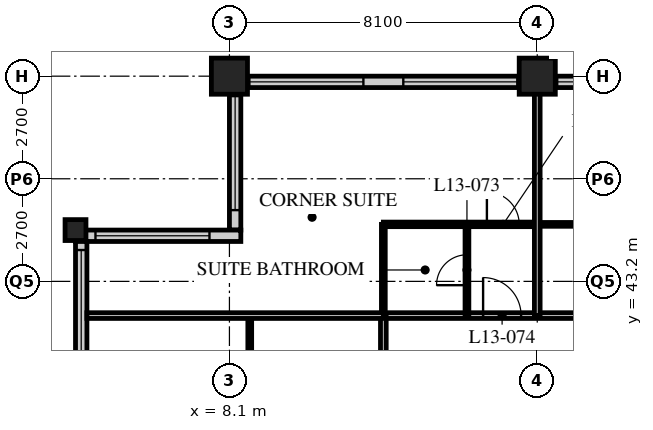
"""IFC4 building model, lengths in metres.
Left out: names, types, materials, properties, quantities, classifications, styles, units other than length and angle.
Written with IfcOpenShell. Run it as: python <this file> out.ifc"""

import sys

from ifc_helpers import new_model, si_unit, direction, frame, frame_2d, origin, origin_2d, place, context, subcontext, project, spatial, rectangle, hollow_rectangle, extrude, element, fill, save


model = new_model("IFC4")
c1 = context("Model", 3, precision=1e-05, world=origin(), true_north=direction((0.0, 1.0)))
c2 = subcontext(c1, "Body", "Model", "MODEL_VIEW")
j1 = project(units=[si_unit("LENGTHUNIT", "METRE"), si_unit("PLANEANGLEUNIT", "RADIAN")], contexts=[c1])
p1 = place(None, origin())
s1 = spatial("IfcSite", under=j1, at=p1, CompositionType="ELEMENT")
p2 = place(p1, origin())
s2 = spatial("IfcBuilding", under=s1, at=p2, CompositionType="ELEMENT")
p3 = place(p2, frame((0.0, 0.0, 56.8)))
s3 = spatial("IfcBuildingStorey", under=s2, at=p3, CompositionType="ELEMENT", Elevation=56.8)
p4 = place(p3, frame((4.05, 44.55, 0.0), z_axis=(0.0, 0.0, 1.0), x_axis=(1.0, 0.0, 0.0)))
e1 = element("IfcColumn", 1, at=p4, inside=s3, PredefinedType="COLUMN", context=c2, shape_type="SweptSolid", body=[
    extrude(hollow_rectangle(XDim=0.55, YDim=0.55, WallThickness=0.05, at=origin_2d()), origin(), (0.0, 0.0, 1.0), 3.4),
])
for number, where, z_axis, x_axis in (
    (2, (8.1, 48.6, 0.0), (0.0, 0.0, 1.0), (1.0, 0.0, 0.0)),
    (3, (16.2, 48.6, 0.0), (0.0, 0.0, 1.0), (1.0, 0.0, 0.0)),
):
    element("IfcColumn", number, at=place(p3, frame(where, z_axis=z_axis, x_axis=x_axis)), inside=s3, PredefinedType="COLUMN", context=c2, shape_type="SweptSolid", body=[
        extrude(hollow_rectangle(XDim=0.95, YDim=0.95, WallThickness=0.095, at=origin_2d()), origin(), (0.0, 0.0, 1.0), 3.4),
    ])
p5 = place(p3, frame((48.3, 48.45, 0.0), z_axis=(0.0, 0.0, 1.0), x_axis=(-1.0, 0.0, 0.0)))
e4 = element("IfcWall", 4, at=p5, inside=s3, PredefinedType="SOLIDWALL", context=c2, shape_type="SweptSolid", body=[
    extrude(rectangle(XDim=40.2, YDim=0.3, at=frame_2d((20.1, 0.0))), origin(), (0.0, 0.0, 1.0), 3.19),
])
p6 = place(p5, frame((0.225, 0.0, 0.9)))
e5 = element("IfcOpeningElement", 5, at=p6, cuts=e4, PredefinedType="OPENING", context=c2, shape_type="SweptSolid", body=[
    extrude(rectangle(XDim=3.0, YDim=2.0, at=frame_2d((1.5, 1.0))), frame((0.0, 0.16, 0.0), z_axis=(0.0, -1.0, 0.0), x_axis=(1.0, 0.0, 0.0)), (0.0, 0.0, 1.0), 0.32),
])
p7 = place(p5, frame((4.275, 0.0, 0.9)))
e6 = element("IfcOpeningElement", 6, at=p7, cuts=e4, PredefinedType="OPENING", context=c2, shape_type="SweptSolid", body=[
    extrude(rectangle(XDim=3.0, YDim=2.0, at=frame_2d((1.5, 1.0))), frame((0.0, 0.16, 0.0), z_axis=(0.0, -1.0, 0.0), x_axis=(1.0, 0.0, 0.0)), (0.0, 0.0, 1.0), 0.32),
])
p8 = place(p5, frame((8.325, 0.0, 0.9)))
e7 = element("IfcOpeningElement", 7, at=p8, cuts=e4, PredefinedType="OPENING", context=c2, shape_type="SweptSolid", body=[
    extrude(rectangle(XDim=3.0, YDim=2.0, at=frame_2d((1.5, 1.0))), frame((0.0, 0.16, 0.0), z_axis=(0.0, -1.0, 0.0), x_axis=(1.0, 0.0, 0.0)), (0.0, 0.0, 1.0), 0.32),
])
p9 = place(p5, frame((12.375, 0.0, 0.9)))
e8 = element("IfcOpeningElement", 8, at=p9, cuts=e4, PredefinedType="OPENING", context=c2, shape_type="SweptSolid", body=[
    extrude(rectangle(XDim=3.0, YDim=2.0, at=frame_2d((1.5, 1.0))), frame((0.0, 0.16, 0.0), z_axis=(0.0, -1.0, 0.0), x_axis=(1.0, 0.0, 0.0)), (0.0, 0.0, 1.0), 0.32),
])
p10 = place(p5, frame((16.425, 0.0, 0.9)))
e9 = element("IfcOpeningElement", 9, at=p10, cuts=e4, PredefinedType="OPENING", context=c2, shape_type="SweptSolid", body=[
    extrude(rectangle(XDim=3.0, YDim=2.0, at=frame_2d((1.5, 1.0))), frame((0.0, 0.16, 0.0), z_axis=(0.0, -1.0, 0.0), x_axis=(1.0, 0.0, 0.0)), (0.0, 0.0, 1.0), 0.32),
])
p11 = place(p5, frame((20.475, 0.0, 0.9)))
e10 = element("IfcOpeningElement", 10, at=p11, cuts=e4, PredefinedType="OPENING", context=c2, shape_type="SweptSolid", body=[
    extrude(rectangle(XDim=3.0, YDim=2.0, at=frame_2d((1.5, 1.0))), frame((0.0, 0.16, 0.0), z_axis=(0.0, -1.0, 0.0), x_axis=(1.0, 0.0, 0.0)), (0.0, 0.0, 1.0), 0.32),
])
p12 = place(p5, frame((24.525, 0.0, 0.9)))
e11 = element("IfcOpeningElement", 11, at=p12, cuts=e4, PredefinedType="OPENING", context=c2, shape_type="SweptSolid", body=[
    extrude(rectangle(XDim=3.0, YDim=2.0, at=frame_2d((1.5, 1.0))), frame((0.0, 0.16, 0.0), z_axis=(0.0, -1.0, 0.0), x_axis=(1.0, 0.0, 0.0)), (0.0, 0.0, 1.0), 0.32),
])
p13 = place(p5, frame((28.575, 0.0, 0.9)))
e12 = element("IfcOpeningElement", 12, at=p13, cuts=e4, PredefinedType="OPENING", context=c2, shape_type="SweptSolid", body=[
    extrude(rectangle(XDim=3.0, YDim=2.0, at=frame_2d((1.5, 1.0))), frame((0.0, 0.16, 0.0), z_axis=(0.0, -1.0, 0.0), x_axis=(1.0, 0.0, 0.0)), (0.0, 0.0, 1.0), 0.32),
])
p14 = place(p5, frame((32.625, 0.0, 0.9)))
e13 = element("IfcOpeningElement", 13, at=p14, cuts=e4, PredefinedType="OPENING", context=c2, shape_type="SweptSolid", body=[
    extrude(rectangle(XDim=3.0, YDim=2.0, at=frame_2d((1.5, 1.0))), frame((0.0, 0.16, 0.0), z_axis=(0.0, -1.0, 0.0), x_axis=(1.0, 0.0, 0.0)), (0.0, 0.0, 1.0), 0.32),
])
p15 = place(p5, frame((36.675, 0.0, 0.9)))
e14 = element("IfcOpeningElement", 14, at=p15, cuts=e4, PredefinedType="OPENING", context=c2, shape_type="SweptSolid", body=[
    extrude(rectangle(XDim=3.0, YDim=2.0, at=frame_2d((1.5, 1.0))), frame((0.0, 0.16, 0.0), z_axis=(0.0, -1.0, 0.0), x_axis=(1.0, 0.0, 0.0)), (0.0, 0.0, 1.0), 0.32),
])
p16 = place(p3, frame((8.25, 48.3, 0.0), z_axis=(0.0, 0.0, 1.0), x_axis=(0.0, -1.0, 0.0)))
e15 = element("IfcWall", 15, at=p16, inside=s3, PredefinedType="SOLIDWALL", context=c2, shape_type="SweptSolid", body=[
    extrude(rectangle(XDim=3.75, YDim=0.3, at=frame_2d((1.875, 0.0))), origin(), (0.0, 0.0, 1.0), 3.19),
])
p17 = place(p16, frame((0.225, 0.0, 0.9)))
e16 = element("IfcOpeningElement", 16, at=p17, cuts=e15, PredefinedType="OPENING", context=c2, shape_type="SweptSolid", body=[
    extrude(rectangle(XDim=3.0, YDim=1.5, at=frame_2d((1.5, 0.75))), frame((0.0, 0.16, 0.0), z_axis=(0.0, -1.0, 0.0), x_axis=(1.0, 0.0, 0.0)), (0.0, 0.0, 1.0), 0.32),
])
p18 = place(p3, frame((8.4, 44.4, 0.0), z_axis=(0.0, 0.0, 1.0), x_axis=(-1.0, 0.0, 0.0)))
e17 = element("IfcWall", 17, at=p18, inside=s3, PredefinedType="SOLIDWALL", context=c2, shape_type="SweptSolid", body=[
    extrude(rectangle(XDim=4.35, YDim=0.3, at=frame_2d((2.175, 0.0))), origin(), (0.0, 0.0, 1.0), 3.19),
])
p19 = place(p18, frame((0.825, 0.0, 0.9)))
e18 = element("IfcOpeningElement", 18, at=p19, cuts=e17, PredefinedType="OPENING", context=c2, shape_type="SweptSolid", body=[
    extrude(rectangle(XDim=3.0, YDim=1.5, at=frame_2d((1.5, 0.75))), frame((0.0, 0.16, 0.0), z_axis=(0.0, -1.0, 0.0), x_axis=(1.0, 0.0, 0.0)), (0.0, 0.0, 1.0), 0.32),
])
p20 = place(p3, frame((4.2, 44.25, 0.0), z_axis=(0.0, 0.0, 1.0), x_axis=(0.0, -1.0, 0.0)))
e19 = element("IfcWall", 19, at=p20, inside=s3, PredefinedType="SOLIDWALL", context=c2, shape_type="SweptSolid", body=[
    extrude(rectangle(XDim=3.75, YDim=0.3, at=frame_2d((1.875, 0.0))), origin(), (0.0, 0.0, 1.0), 3.19),
])
p21 = place(p20, frame((0.225, 0.0, 0.9)))
e20 = element("IfcOpeningElement", 20, at=p21, cuts=e19, PredefinedType="OPENING", context=c2, shape_type="SweptSolid", body=[
    extrude(rectangle(XDim=3.0, YDim=1.5, at=frame_2d((1.5, 0.75))), frame((0.0, 0.16, 0.0), z_axis=(0.0, -1.0, 0.0), x_axis=(1.0, 0.0, 0.0)), (0.0, 0.0, 1.0), 0.32),
])
p22 = place(p3, frame((12.15, 42.3, 0.0), z_axis=(0.0, 0.0, 1.0), x_axis=(1.0, 0.0, 0.0)))
e21 = element("IfcWall", 21, at=p22, inside=s3, PredefinedType="PARTITIONING", context=c2, shape_type="SweptSolid", body=[
    extrude(rectangle(XDim=32.4, YDim=0.15, at=frame_2d((16.2, 0.0))), origin(), (0.0, 0.0, 1.0), 3.19),
])
p23 = place(p22, frame((6.5, 0.0, 0.0)))
e22 = element("IfcOpeningElement", 22, at=p23, cuts=e21, PredefinedType="OPENING", context=c2, shape_type="SweptSolid", body=[
    extrude(rectangle(XDim=1.0, YDim=2.1, at=frame_2d((0.5, 1.05))), frame((0.0, 0.085, 0.0), z_axis=(0.0, -1.0, 0.0), x_axis=(1.0, 0.0, 0.0)), (0.0, 0.0, 1.0), 0.17),
])
p24 = place(p22, frame((10.55, 0.0, 0.0)))
e23 = element("IfcOpeningElement", 23, at=p24, cuts=e21, PredefinedType="OPENING", context=c2, shape_type="SweptSolid", body=[
    extrude(rectangle(XDim=1.0, YDim=2.1, at=frame_2d((0.5, 1.05))), frame((0.0, 0.085, 0.0), z_axis=(0.0, -1.0, 0.0), x_axis=(1.0, 0.0, 0.0)), (0.0, 0.0, 1.0), 0.17),
])
p25 = place(p22, frame((14.6, 0.0, 0.0)))
e24 = element("IfcOpeningElement", 24, at=p25, cuts=e21, PredefinedType="OPENING", context=c2, shape_type="SweptSolid", body=[
    extrude(rectangle(XDim=1.0, YDim=2.1, at=frame_2d((0.5, 1.05))), frame((0.0, 0.085, 0.0), z_axis=(0.0, -1.0, 0.0), x_axis=(1.0, 0.0, 0.0)), (0.0, 0.0, 1.0), 0.17),
])
p26 = place(p22, frame((18.65, 0.0, 0.0)))
e25 = element("IfcOpeningElement", 25, at=p26, cuts=e21, PredefinedType="OPENING", context=c2, shape_type="SweptSolid", body=[
    extrude(rectangle(XDim=1.0, YDim=2.1, at=frame_2d((0.5, 1.05))), frame((0.0, 0.085, 0.0), z_axis=(0.0, -1.0, 0.0), x_axis=(1.0, 0.0, 0.0)), (0.0, 0.0, 1.0), 0.17),
])
p27 = place(p22, frame((22.7, 0.0, 0.0)))
e26 = element("IfcOpeningElement", 26, at=p27, cuts=e21, PredefinedType="OPENING", context=c2, shape_type="SweptSolid", body=[
    extrude(rectangle(XDim=1.0, YDim=2.1, at=frame_2d((0.5, 1.05))), frame((0.0, 0.085, 0.0), z_axis=(0.0, -1.0, 0.0), x_axis=(1.0, 0.0, 0.0)), (0.0, 0.0, 1.0), 0.17),
])
p28 = place(p22, frame((26.75, 0.0, 0.0)))
e27 = element("IfcOpeningElement", 27, at=p28, cuts=e21, PredefinedType="OPENING", context=c2, shape_type="SweptSolid", body=[
    extrude(rectangle(XDim=1.0, YDim=2.1, at=frame_2d((0.5, 1.05))), frame((0.0, 0.085, 0.0), z_axis=(0.0, -1.0, 0.0), x_axis=(1.0, 0.0, 0.0)), (0.0, 0.0, 1.0), 0.17),
])
p29 = place(p22, frame((28.775, 0.0, 0.0)))
e28 = element("IfcOpeningElement", 28, at=p29, cuts=e21, PredefinedType="OPENING", context=c2, shape_type="SweptSolid", body=[
    extrude(rectangle(XDim=1.0, YDim=2.1, at=frame_2d((0.5, 1.05))), frame((0.0, 0.085, 0.0), z_axis=(0.0, -1.0, 0.0), x_axis=(1.0, 0.0, 0.0)), (0.0, 0.0, 1.0), 0.17),
])
p30 = place(p22, frame((2.625, 0.0, 0.0)))
e29 = element("IfcOpeningElement", 29, at=p30, cuts=e21, PredefinedType="OPENING", context=c2, shape_type="SweptSolid", body=[
    extrude(rectangle(XDim=1.0, YDim=2.1, at=frame_2d((0.5, 1.05))), frame((0.0, 0.085, 0.0), z_axis=(0.0, -1.0, 0.0), x_axis=(1.0, 0.0, 0.0)), (0.0, 0.0, 1.0), 0.17),
])
p31 = place(p3, frame((12.15, 12.15, 0.0), z_axis=(0.0, 0.0, 1.0), x_axis=(0.0, 1.0, 0.0)))
e30 = element("IfcWall", 30, at=p31, inside=s3, PredefinedType="PARTITIONING", context=c2, shape_type="SweptSolid", body=[
    extrude(rectangle(XDim=30.15, YDim=0.15, at=frame_2d((15.075, 0.0))), origin(), (0.0, 0.0, 1.0), 3.19),
])
p32 = place(p31, frame((2.45, 0.0, 0.0)))
e31 = element("IfcOpeningElement", 31, at=p32, cuts=e30, PredefinedType="OPENING", context=c2, shape_type="SweptSolid", body=[
    extrude(rectangle(XDim=1.0, YDim=2.1, at=frame_2d((0.5, 1.05))), frame((0.0, 0.085, 0.0), z_axis=(0.0, -1.0, 0.0), x_axis=(1.0, 0.0, 0.0)), (0.0, 0.0, 1.0), 0.17),
])
p33 = place(p31, frame((6.5, 0.0, 0.0)))
e32 = element("IfcOpeningElement", 32, at=p33, cuts=e30, PredefinedType="OPENING", context=c2, shape_type="SweptSolid", body=[
    extrude(rectangle(XDim=1.0, YDim=2.1, at=frame_2d((0.5, 1.05))), frame((0.0, 0.085, 0.0), z_axis=(0.0, -1.0, 0.0), x_axis=(1.0, 0.0, 0.0)), (0.0, 0.0, 1.0), 0.17),
])
p34 = place(p31, frame((10.55, 0.0, 0.0)))
e33 = element("IfcOpeningElement", 33, at=p34, cuts=e30, PredefinedType="OPENING", context=c2, shape_type="SweptSolid", body=[
    extrude(rectangle(XDim=1.0, YDim=2.1, at=frame_2d((0.5, 1.05))), frame((0.0, 0.085, 0.0), z_axis=(0.0, -1.0, 0.0), x_axis=(1.0, 0.0, 0.0)), (0.0, 0.0, 1.0), 0.17),
])
p35 = place(p31, frame((14.6, 0.0, 0.0)))
e34 = element("IfcOpeningElement", 34, at=p35, cuts=e30, PredefinedType="OPENING", context=c2, shape_type="SweptSolid", body=[
    extrude(rectangle(XDim=1.0, YDim=2.1, at=frame_2d((0.5, 1.05))), frame((0.0, 0.085, 0.0), z_axis=(0.0, -1.0, 0.0), x_axis=(1.0, 0.0, 0.0)), (0.0, 0.0, 1.0), 0.17),
])
p36 = place(p31, frame((21.65, 0.0, 0.0)))
e35 = element("IfcOpeningElement", 35, at=p36, cuts=e30, PredefinedType="OPENING", context=c2, shape_type="SweptSolid", body=[
    extrude(rectangle(XDim=1.0, YDim=2.1, at=frame_2d((0.5, 1.05))), frame((0.0, 0.085, 0.0), z_axis=(0.0, -1.0, 0.0), x_axis=(1.0, 0.0, 0.0)), (0.0, 0.0, 1.0), 0.17),
])
p37 = place(p31, frame((26.7, 0.0, 0.0)))
e36 = element("IfcOpeningElement", 36, at=p37, cuts=e30, PredefinedType="OPENING", context=c2, shape_type="SweptSolid", body=[
    extrude(rectangle(XDim=1.0, YDim=2.1, at=frame_2d((0.5, 1.05))), frame((0.0, 0.085, 0.0), z_axis=(0.0, -1.0, 0.0), x_axis=(1.0, 0.0, 0.0)), (0.0, 0.0, 1.0), 0.17),
])
for number, where, z_axis, x_axis in (
    (37, (16.2, 44.7, 0.0), (0.0, 0.0, 1.0), (1.0, 0.0, 0.0)),
    (38, (8.635, 40.0, 0.0), (0.0, 0.0, 1.0), (0.0, 1.0, 0.0)),
):
    element("IfcWall", number, at=place(p3, frame(where, z_axis=z_axis, x_axis=x_axis)), inside=s3, PredefinedType="PARTITIONING", context=c2, shape_type="SweptSolid", body=[
        extrude(rectangle(XDim=2.3, YDim=0.1, at=frame_2d((1.15, 0.0))), origin(), (0.0, 0.0, 1.0), 3.19),
    ])
p38 = place(p3, frame((12.15, 44.7, 0.0), z_axis=(0.0, 0.0, 1.0), x_axis=(1.0, 0.0, 0.0)))
e39 = element("IfcWall", 39, at=p38, inside=s3, PredefinedType="PARTITIONING", context=c2, shape_type="SweptSolid", body=[
    extrude(rectangle(XDim=4.05, YDim=0.12, at=frame_2d((2.025, 0.0))), origin(), (0.0, 0.0, 1.0), 3.19),
])
p39 = place(p38, frame((2.725, 0.0, 0.0)))
e40 = element("IfcOpeningElement", 40, at=p39, cuts=e39, PredefinedType="OPENING", context=c2, shape_type="SweptSolid", body=[
    extrude(rectangle(XDim=0.85, YDim=2.1, at=frame_2d((0.425, 1.05))), frame((0.0, 0.07, 0.0), z_axis=(0.0, -1.0, 0.0), x_axis=(1.0, 0.0, 0.0)), (0.0, 0.0, 1.0), 0.14),
])
p40 = place(p3, frame((14.35, 42.3, 0.0), z_axis=(0.0, 0.0, 1.0), x_axis=(0.0, 1.0, 0.0)))
e41 = element("IfcWall", 41, at=p40, inside=s3, PredefinedType="PARTITIONING", context=c2, shape_type="SweptSolid", body=[
    extrude(rectangle(XDim=2.4, YDim=0.1, at=frame_2d((1.2, 0.0))), origin(), (0.0, 0.0, 1.0), 3.19),
])
p41 = place(p40, frame((0.8, 0.0, 0.0)))
e42 = element("IfcOpeningElement", 42, at=p41, cuts=e41, PredefinedType="OPENING", context=c2, shape_type="SweptSolid", body=[
    extrude(rectangle(XDim=0.8, YDim=2.1, at=frame_2d((0.4, 1.05))), frame((0.0, 0.06, 0.0), z_axis=(0.0, -1.0, 0.0), x_axis=(1.0, 0.0, 0.0)), (0.0, 0.0, 1.0), 0.12),
])
p42 = place(p3, frame((12.15, 42.3, 0.0), z_axis=(0.0, 0.0, 1.0), x_axis=(0.0, 1.0, 0.0)))
e43 = element("IfcWall", 43, at=p42, inside=s3, PredefinedType="PARTITIONING", context=c2, shape_type="SweptSolid", body=[
    extrude(rectangle(XDim=2.4, YDim=0.1, at=frame_2d((1.2, 0.0))), origin(), (0.0, 0.0, 1.0), 3.19),
])
p43 = place(p3, frame((4.35, 42.3, 0.0), z_axis=(0.0, 0.0, 1.0), x_axis=(1.0, 0.0, 0.0)))
e44 = element("IfcWall", 44, at=p43, inside=s3, PredefinedType="PARTITIONING", context=c2, shape_type="SweptSolid", body=[
    extrude(rectangle(XDim=7.8, YDim=0.15, at=frame_2d((3.9, 0.0))), origin(), (0.0, 0.0, 1.0), 3.19),
])
p44 = place(p3, frame((16.2, 42.3, 0.0), z_axis=(0.0, 0.0, 1.0), x_axis=(0.0, 1.0, 0.0)))
e45 = element("IfcWall", 45, at=p44, inside=s3, PredefinedType="PARTITIONING", context=c2, shape_type="SweptSolid", body=[
    extrude(rectangle(XDim=6.0, YDim=0.15, at=frame_2d((3.0, 0.0))), origin(), (0.0, 0.0, 1.0), 2.578),
])
p45 = place(p13, origin())
e46 = element("IfcWindow", 46, at=p45, inside=s3, PartitioningType="SINGLE_PANEL", PredefinedType="WINDOW", context=c2, shape_type="SweptSolid", body=[
    extrude(rectangle(XDim=3.0, YDim=2.0, at=frame_2d((1.5, 1.0))), frame((0.0, 0.03, 0.0), z_axis=(0.0, -1.0, 0.0), x_axis=(1.0, 0.0, 0.0)), (0.0, 0.0, 1.0), 0.06),
])
fill(e12, e46)
p46 = place(p14, origin())
e47 = element("IfcWindow", 47, at=p46, inside=s3, PartitioningType="SINGLE_PANEL", PredefinedType="WINDOW", context=c2, shape_type="SweptSolid", body=[
    extrude(rectangle(XDim=3.0, YDim=2.0, at=frame_2d((1.5, 1.0))), frame((0.0, 0.03, 0.0), z_axis=(0.0, -1.0, 0.0), x_axis=(1.0, 0.0, 0.0)), (0.0, 0.0, 1.0), 0.06),
])
fill(e13, e47)
p47 = place(p15, origin())
e48 = element("IfcWindow", 48, at=p47, inside=s3, PartitioningType="SINGLE_PANEL", PredefinedType="WINDOW", context=c2, shape_type="SweptSolid", body=[
    extrude(rectangle(XDim=3.0, YDim=2.0, at=frame_2d((1.5, 1.0))), frame((0.0, 0.03, 0.0), z_axis=(0.0, -1.0, 0.0), x_axis=(1.0, 0.0, 0.0)), (0.0, 0.0, 1.0), 0.06),
])
fill(e14, e48)
p48 = place(p17, origin())
e49 = element("IfcWindow", 49, at=p48, inside=s3, PartitioningType="SINGLE_PANEL", PredefinedType="WINDOW", context=c2, shape_type="SweptSolid", body=[
    extrude(rectangle(XDim=3.0, YDim=1.5, at=frame_2d((1.5, 0.75))), frame((0.0, 0.03, 0.0), z_axis=(0.0, -1.0, 0.0), x_axis=(1.0, 0.0, 0.0)), (0.0, 0.0, 1.0), 0.06),
])
fill(e16, e49)
p49 = place(p19, origin())
e50 = element("IfcWindow", 50, at=p49, inside=s3, PartitioningType="SINGLE_PANEL", PredefinedType="WINDOW", context=c2, shape_type="SweptSolid", body=[
    extrude(rectangle(XDim=3.0, YDim=1.5, at=frame_2d((1.5, 0.75))), frame((0.0, 0.03, 0.0), z_axis=(0.0, -1.0, 0.0), x_axis=(1.0, 0.0, 0.0)), (0.0, 0.0, 1.0), 0.06),
])
fill(e18, e50)
p50 = place(p21, origin())
e51 = element("IfcWindow", 51, at=p50, inside=s3, PartitioningType="SINGLE_PANEL", PredefinedType="WINDOW", context=c2, shape_type="SweptSolid", body=[
    extrude(rectangle(XDim=3.0, YDim=1.5, at=frame_2d((1.5, 0.75))), frame((0.0, 0.03, 0.0), z_axis=(0.0, -1.0, 0.0), x_axis=(1.0, 0.0, 0.0)), (0.0, 0.0, 1.0), 0.06),
])
fill(e20, e51)
p51 = place(p41, origin())
e52 = element("IfcDoor", 52, at=p51, inside=s3, OperationType="SINGLE_SWING_LEFT", PredefinedType="DOOR", context=c2, shape_type="SweptSolid", body=[
    extrude(rectangle(XDim=0.8, YDim=2.1, at=frame_2d((0.4, 1.05))), frame((0.0, 0.025, 0.0), z_axis=(0.0, -1.0, 0.0), x_axis=(1.0, 0.0, 0.0)), (0.0, 0.0, 1.0), 0.05),
])
fill(e42, e52)
p52 = place(p30, origin())
e53 = element("IfcDoor", 53, at=p52, inside=s3, OperationType="SINGLE_SWING_LEFT", PredefinedType="DOOR", context=c2, shape_type="SweptSolid", body=[
    extrude(rectangle(XDim=1.0, YDim=2.1, at=frame_2d((0.5, 1.05))), frame((0.0, 0.025, 0.0), z_axis=(0.0, -1.0, 0.0), x_axis=(1.0, 0.0, 0.0)), (0.0, 0.0, 1.0), 0.05),
])
fill(e29, e53)
p53 = place(p39, origin())
e54 = element("IfcDoor", 54, at=p53, inside=s3, OperationType="SINGLE_SWING_LEFT", PredefinedType="DOOR", context=c2, shape_type="SweptSolid", body=[
    extrude(rectangle(XDim=0.85, YDim=2.1, at=frame_2d((0.425, 1.05))), frame((0.0, 0.025, 0.0), z_axis=(0.0, -1.0, 0.0), x_axis=(1.0, 0.0, 0.0)), (0.0, 0.0, 1.0), 0.05),
])
fill(e40, e54)
save(model, sys.argv[1])
